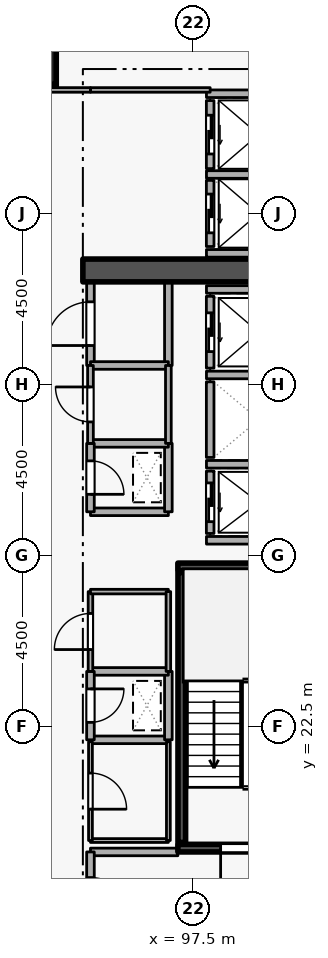
"""IFC4 building model, lengths in metres.
Left out: names, types, materials, properties, quantities, classifications, styles, units other than length and angle.
Written with IfcOpenShell. Run it as: python <this file> out.ifc"""

import sys

from ifc_helpers import new_model, si_unit, direction, frame, frame_2d, origin, origin_2d, place, context, subcontext, project, spatial, rectangle, extrude, element, fill, save


model = new_model("IFC4")
c1 = context("Model", 3, precision=1e-05, world=origin(), true_north=direction((0.0, 1.0)))
c2 = subcontext(c1, "Body", "Model", "MODEL_VIEW")
j1 = project(units=[si_unit("LENGTHUNIT", "METRE"), si_unit("PLANEANGLEUNIT", "RADIAN")], contexts=[c1])
p1 = place(None, origin())
s1 = spatial("IfcSite", under=j1, at=p1, CompositionType="ELEMENT")
p2 = place(p1, origin())
s2 = spatial("IfcBuilding", under=s1, at=p2, CompositionType="ELEMENT")
p3 = place(p2, frame((0.0, 0.0, 101.7)))
s3 = spatial("IfcBuildingStorey", under=s2, at=p3, CompositionType="ELEMENT", Elevation=101.7)
p4 = place(p3, frame((94.6, 34.5, 0.0), z_axis=(0.0, 0.0, 1.0), x_axis=(1.0, 0.0, 0.0)))
e1 = element("IfcWall", 1, at=p4, inside=s3, PredefinedType="SHEAR", context=c2, shape_type="SweptSolid", body=[
    extrude(rectangle(XDim=5.7, YDim=0.6, at=frame_2d((2.85, 0.0))), origin(), (0.0, 0.0, 1.0), 3.6),
])
p5 = place(p3, frame((93.3, 40.0, 0.0), z_axis=(0.0, 0.0, 1.0), x_axis=(1.0, 0.0, 0.0)))
e2 = element("IfcColumn", 2, at=p5, inside=s3, PredefinedType="COLUMN", context=c2, shape_type="SweptSolid", body=[
    extrude(rectangle(XDim=1.2, YDim=1.2, at=origin_2d()), origin(), (0.0, 0.0, 1.0), 3.6),
])
p6 = place(p3, frame((97.95, 29.22, 0.0), z_axis=(0.0, 0.0, 1.0), x_axis=(0.0, -1.0, 0.0)))
e3 = element("IfcWall", 3, at=p6, inside=s3, PredefinedType="STANDARD", context=c2, shape_type="SweptSolid", body=[
    extrude(rectangle(XDim=1.64, YDim=0.2, at=frame_2d((0.82, 0.0))), origin(), (0.0, 0.0, 1.0), 3.34),
])
p7 = place(p6, frame((0.31, 0.0, 0.0)))
e4 = element("IfcOpeningElement", 4, at=p7, cuts=e3, PredefinedType="OPENING", context=c2, shape_type="SweptSolid", body=[
    extrude(rectangle(XDim=1.02, YDim=2.06, at=frame_2d((0.51, 1.03))), frame((0.0, 0.11, 0.0), z_axis=(0.0, -1.0, 0.0), x_axis=(1.0, 0.0, 0.0)), (0.0, 0.0, 1.0), 0.22),
])
p8 = place(p3, frame((97.95, 31.57, 0.0), z_axis=(0.0, 0.0, 1.0), x_axis=(0.0, -1.0, 0.0)))
e5 = element("IfcWall", 5, at=p8, inside=s3, PredefinedType="STANDARD", context=c2, shape_type="SweptSolid", body=[
    extrude(rectangle(XDim=1.99, YDim=0.2, at=frame_2d((0.995, 0.0))), origin(), (0.0, 0.0, 1.0), 3.34),
])
p9 = place(p3, frame((97.95, 33.82, 0.0), z_axis=(0.0, 0.0, 1.0), x_axis=(0.0, -1.0, 0.0)))
e6 = element("IfcWall", 6, at=p9, inside=s3, PredefinedType="STANDARD", context=c2, shape_type="SweptSolid", body=[
    extrude(rectangle(XDim=1.89, YDim=0.2, at=frame_2d((0.945, 0.0))), origin(), (0.0, 0.0, 1.0), 3.34),
])
p10 = place(p9, frame((0.435, 0.0, 0.0)))
e7 = element("IfcOpeningElement", 7, at=p10, cuts=e6, PredefinedType="OPENING", context=c2, shape_type="SweptSolid", body=[
    extrude(rectangle(XDim=1.02, YDim=2.06, at=frame_2d((0.51, 1.03))), frame((0.0, 0.11, 0.0), z_axis=(0.0, -1.0, 0.0), x_axis=(1.0, 0.0, 0.0)), (0.0, 0.0, 1.0), 0.22),
])
p11 = place(p3, frame((97.95, 36.87, 0.0), z_axis=(0.0, 0.0, 1.0), x_axis=(0.0, -1.0, 0.0)))
e8 = element("IfcWall", 8, at=p11, inside=s3, PredefinedType="STANDARD", context=c2, shape_type="SweptSolid", body=[
    extrude(rectangle(XDim=1.74, YDim=0.2, at=frame_2d((0.87, 0.0))), origin(), (0.0, 0.0, 1.0), 3.34),
])
p12 = place(p11, frame((0.36, 0.0, 0.0)))
e9 = element("IfcOpeningElement", 9, at=p12, cuts=e8, PredefinedType="OPENING", context=c2, shape_type="SweptSolid", body=[
    extrude(rectangle(XDim=1.02, YDim=2.06, at=frame_2d((0.51, 1.03))), frame((0.0, 0.11, 0.0), z_axis=(0.0, -1.0, 0.0), x_axis=(1.0, 0.0, 0.0)), (0.0, 0.0, 1.0), 0.22),
])
p13 = place(p3, frame((97.95, 38.97, 0.0), z_axis=(0.0, 0.0, 1.0), x_axis=(0.0, -1.0, 0.0)))
e10 = element("IfcWall", 10, at=p13, inside=s3, PredefinedType="STANDARD", context=c2, shape_type="SweptSolid", body=[
    extrude(rectangle(XDim=1.79, YDim=0.2, at=frame_2d((0.895, 0.0))), origin(), (0.0, 0.0, 1.0), 3.34),
])
p14 = place(p13, frame((0.385, 0.0, 0.0)))
e11 = element("IfcOpeningElement", 11, at=p14, cuts=e10, PredefinedType="OPENING", context=c2, shape_type="SweptSolid", body=[
    extrude(rectangle(XDim=1.02, YDim=2.06, at=frame_2d((0.51, 1.03))), frame((0.0, 0.11, 0.0), z_axis=(0.0, -1.0, 0.0), x_axis=(1.0, 0.0, 0.0)), (0.0, 0.0, 1.0), 0.22),
])
for number, where, z_axis, x_axis in (
    (12, (97.852, 29.4, 0.0), (0.0, 0.0, 1.0), (1.0, 0.0, 0.0)),
    (13, (97.852, 27.4, 0.0), (0.0, 0.0, 1.0), (1.0, 0.0, 0.0)),
    (14, (97.852, 31.75, 0.0), (0.0, 0.0, 1.0), (1.0, 0.0, 0.0)),
    (15, (97.852, 34.0, 0.0), (0.0, 0.0, 1.0), (1.0, 0.0, 0.0)),
):
    element("IfcWall", number, at=place(p3, frame(where, z_axis=z_axis, x_axis=x_axis)), inside=s3, PredefinedType="STANDARD", context=c2, shape_type="SweptSolid", body=[
        extrude(rectangle(XDim=2.436, YDim=0.2, at=frame_2d((1.218, 0.0))), origin(), (0.0, 0.0, 1.0), 3.34),
    ])
for number, where, z_axis, x_axis in (
    (16, (97.852, 37.025, 0.0), (0.0, 0.0, 1.0), (1.0, 0.0, 0.0)),
    (17, (97.852, 34.95, 0.0), (0.0, 0.0, 1.0), (1.0, 0.0, 0.0)),
):
    element("IfcWall", number, at=place(p3, frame(where, z_axis=z_axis, x_axis=x_axis)), inside=s3, PredefinedType="STANDARD", context=c2, shape_type="SweptSolid", body=[
        extrude(rectangle(XDim=2.746, YDim=0.2, at=frame_2d((1.373, 0.0))), origin(), (0.0, 0.0, 1.0), 3.34),
    ])
p15 = place(p3, frame((97.852, 39.15, 0.0), z_axis=(0.0, 0.0, 1.0), x_axis=(1.0, 0.0, 0.0)))
e18 = element("IfcWall", 18, at=p15, inside=s3, PredefinedType="STANDARD", context=c2, shape_type="SweptSolid", body=[
    extrude(rectangle(XDim=2.636, YDim=0.2, at=frame_2d((1.318, 0.0))), origin(), (0.0, 0.0, 1.0), 3.34),
])
p16 = place(p3, frame((100.45, 19.3, 0.0), z_axis=(0.0, 0.0, 1.0), x_axis=(-1.0, 0.0, 0.0)))
e19 = element("IfcWall", 19, at=p16, inside=s3, PredefinedType="SHEAR", context=c2, shape_type="SweptSolid", body=[
    extrude(rectangle(XDim=3.35, YDim=0.2, at=frame_2d((1.675, 0.0))), origin(), (0.0, 0.0, 1.0), 3.6),
])
p17 = place(p16, frame((1.125, 0.0, 0.0)))
e20 = element("IfcOpeningElement", 20, at=p17, cuts=e19, PredefinedType="OPENING", context=c2, shape_type="SweptSolid", body=[
    extrude(rectangle(XDim=1.1, YDim=2.1, at=frame_2d((0.55, 1.05))), frame((0.0, 0.11, 0.0), z_axis=(0.0, -1.0, 0.0), x_axis=(1.0, 0.0, 0.0)), (0.0, 0.0, 1.0), 0.22),
])
p18 = place(p3, frame((97.1, 26.7, 0.0), z_axis=(0.0, 0.0, 1.0), x_axis=(1.0, 0.0, 0.0)))
e21 = element("IfcWall", 21, at=p18, inside=s3, PredefinedType="SHEAR", context=c2, shape_type="SweptSolid", body=[
    extrude(rectangle(XDim=3.35, YDim=0.2, at=frame_2d((1.675, 0.0))), origin(), (0.0, 0.0, 1.0), 3.6),
])
p19 = place(p3, frame((97.203, 26.55, 0.0), z_axis=(0.0, 0.0, 1.0), x_axis=(0.0, -1.0, 0.0)))
e22 = element("IfcWall", 22, at=p19, inside=s3, PredefinedType="SHEAR", context=c2, shape_type="SweptSolid", body=[
    extrude(rectangle(XDim=7.1, YDim=0.2, at=frame_2d((3.55, 0.0))), origin(), (0.0, 0.0, 1.0), 3.6),
])
p20 = place(p3, frame((97.1, 19.2, 0.0), z_axis=(0.0, 0.0, 1.0), x_axis=(-1.0, 0.0, 0.0)))
e23 = element("IfcWall", 23, at=p20, inside=s3, PredefinedType="STANDARD", context=c2, shape_type="SweptSolid", body=[
    extrude(rectangle(XDim=2.3, YDim=0.2, at=frame_2d((1.15, 0.0))), origin(), (0.0, 0.0, 1.0), 2.545),
])
p21 = place(p3, frame((94.8, 19.2, 0.0), z_axis=(0.0, 0.0, 1.0), x_axis=(0.0, -1.0, 0.0)))
e24 = element("IfcWall", 24, at=p21, inside=s3, PredefinedType="STANDARD", context=c2, shape_type="SweptSolid", body=[
    extrude(rectangle(XDim=2.5, YDim=0.2, at=frame_2d((1.25, 0.0))), origin(), (0.0, 0.0, 1.0), 3.34),
])
p22 = place(p21, frame((0.675, 0.0, 0.0)))
e25 = element("IfcOpeningElement", 25, at=p22, cuts=e24, PredefinedType="OPENING", context=c2, shape_type="SweptSolid", body=[
    extrude(rectangle(XDim=1.15, YDim=2.1, at=frame_2d((0.575, 1.05))), frame((0.0, 0.11, 0.0), z_axis=(0.0, -1.0, 0.0), x_axis=(1.0, 0.0, 0.0)), (0.0, 0.0, 1.0), 0.22),
])
p23 = place(p3, frame((94.8, 28.15, 0.0), z_axis=(0.0, 0.0, 1.0), x_axis=(1.0, 0.0, 0.0)))
e26 = element("IfcWall", 26, at=p23, inside=s3, PredefinedType="STANDARD", context=c2, shape_type="SweptSolid", body=[
    extrude(rectangle(XDim=2.05, YDim=0.2, at=frame_2d((1.025, 0.0))), origin(), (0.0, 0.0, 1.0), 3.34),
])
p24 = place(p3, frame((96.85, 28.15, 0.0), z_axis=(0.0, 0.0, 1.0), x_axis=(0.0, 1.0, 0.0)))
e27 = element("IfcWall", 27, at=p24, inside=s3, PredefinedType="STANDARD", context=c2, shape_type="SweptSolid", body=[
    extrude(rectangle(XDim=1.8, YDim=0.2, at=frame_2d((0.9, 0.0))), origin(), (0.0, 0.0, 1.0), 3.34),
])
p25 = place(p3, frame((96.85, 29.95, 0.0), z_axis=(0.0, 0.0, 1.0), x_axis=(-1.0, 0.0, 0.0)))
e28 = element("IfcWall", 28, at=p25, inside=s3, PredefinedType="STANDARD", context=c2, shape_type="SweptSolid", body=[
    extrude(rectangle(XDim=2.05, YDim=0.2, at=frame_2d((1.025, 0.0))), origin(), (0.0, 0.0, 1.0), 3.34),
])
p26 = place(p3, frame((94.8, 29.95, 0.0), z_axis=(0.0, 0.0, 1.0), x_axis=(0.0, -1.0, 0.0)))
e29 = element("IfcWall", 29, at=p26, inside=s3, PredefinedType="STANDARD", context=c2, shape_type="SweptSolid", body=[
    extrude(rectangle(XDim=1.8, YDim=0.2, at=frame_2d((0.9, 0.0))), origin(), (0.0, 0.0, 1.0), 3.34),
])
p27 = place(p26, frame((0.46, 0.0, 0.0)))
e30 = element("IfcOpeningElement", 30, at=p27, cuts=e29, PredefinedType="OPENING", context=c2, shape_type="SweptSolid", body=[
    extrude(rectangle(XDim=0.88, YDim=2.04, at=frame_2d((0.44, 1.02))), frame((0.0, 0.11, 0.0), z_axis=(0.0, -1.0, 0.0), x_axis=(1.0, 0.0, 0.0)), (0.0, 0.0, 1.0), 0.22),
])
p28 = place(p3, frame((94.8, 22.15, 0.0), z_axis=(0.0, 0.0, 1.0), x_axis=(1.0, 0.0, 0.0)))
e31 = element("IfcWall", 31, at=p28, inside=s3, PredefinedType="STANDARD", context=c2, shape_type="SweptSolid", body=[
    extrude(rectangle(XDim=2.05, YDim=0.2, at=frame_2d((1.025, 0.0))), origin(), (0.0, 0.0, 1.0), 3.34),
])
p29 = place(p3, frame((96.85, 22.15, 0.0), z_axis=(0.0, 0.0, 1.0), x_axis=(0.0, 1.0, 0.0)))
e32 = element("IfcWall", 32, at=p29, inside=s3, PredefinedType="STANDARD", context=c2, shape_type="SweptSolid", body=[
    extrude(rectangle(XDim=1.8, YDim=0.2, at=frame_2d((0.9, 0.0))), origin(), (0.0, 0.0, 1.0), 3.34),
])
p30 = place(p3, frame((96.85, 23.95, 0.0), z_axis=(0.0, 0.0, 1.0), x_axis=(-1.0, 0.0, 0.0)))
e33 = element("IfcWall", 33, at=p30, inside=s3, PredefinedType="STANDARD", context=c2, shape_type="SweptSolid", body=[
    extrude(rectangle(XDim=2.05, YDim=0.2, at=frame_2d((1.025, 0.0))), origin(), (0.0, 0.0, 1.0), 3.34),
])
p31 = place(p3, frame((94.8, 23.95, 0.0), z_axis=(0.0, 0.0, 1.0), x_axis=(0.0, -1.0, 0.0)))
e34 = element("IfcWall", 34, at=p31, inside=s3, PredefinedType="STANDARD", context=c2, shape_type="SweptSolid", body=[
    extrude(rectangle(XDim=1.8, YDim=0.2, at=frame_2d((0.9, 0.0))), origin(), (0.0, 0.0, 1.0), 3.34),
])
p32 = place(p31, frame((0.46, 0.0, 0.0)))
e35 = element("IfcOpeningElement", 35, at=p32, cuts=e34, PredefinedType="OPENING", context=c2, shape_type="SweptSolid", body=[
    extrude(rectangle(XDim=0.88, YDim=2.04, at=frame_2d((0.44, 1.02))), frame((0.0, 0.11, 0.0), z_axis=(0.0, -1.0, 0.0), x_axis=(1.0, 0.0, 0.0)), (0.0, 0.0, 1.0), 0.22),
])
p33 = place(p3, frame((94.8, 32.0, 0.0), z_axis=(0.0, 0.0, 1.0), x_axis=(0.0, 1.0, 0.0)))
e36 = element("IfcWall", 36, at=p33, inside=s3, PredefinedType="STANDARD", context=c2, shape_type="SweptSolid", body=[
    extrude(rectangle(XDim=2.2, YDim=0.2, at=frame_2d((1.1, 0.0))), origin(), (0.0, 0.0, 1.0), 3.34),
])
p34 = place(p33, frame((0.525, 0.0, 0.0)))
e37 = element("IfcOpeningElement", 37, at=p34, cuts=e36, PredefinedType="OPENING", context=c2, shape_type="SweptSolid", body=[
    extrude(rectangle(XDim=1.15, YDim=2.1, at=frame_2d((0.575, 1.05))), frame((0.0, 0.11, 0.0), z_axis=(0.0, -1.0, 0.0), x_axis=(1.0, 0.0, 0.0)), (0.0, 0.0, 1.0), 0.22),
])
p35 = place(p3, frame((96.85, 34.2, 0.0), z_axis=(0.0, 0.0, 1.0), x_axis=(0.0, -1.0, 0.0)))
e38 = element("IfcWall", 38, at=p35, inside=s3, PredefinedType="STANDARD", context=c2, shape_type="SweptSolid", body=[
    extrude(rectangle(XDim=2.2, YDim=0.2, at=frame_2d((1.1, 0.0))), origin(), (0.0, 0.0, 1.0), 3.34),
])
p36 = place(p3, frame((96.85, 32.0, 0.0), z_axis=(0.0, 0.0, 1.0), x_axis=(-1.0, 0.0, 0.0)))
e39 = element("IfcWall", 39, at=p36, inside=s3, PredefinedType="STANDARD", context=c2, shape_type="SweptSolid", body=[
    extrude(rectangle(XDim=2.05, YDim=0.2, at=frame_2d((1.025, 0.0))), origin(), (0.0, 0.0, 1.0), 3.34),
])
p37 = place(p3, frame((94.8, 19.5, 0.0), z_axis=(0.0, 0.0, 1.0), x_axis=(1.0, 0.0, 0.0)))
e40 = element("IfcWall", 40, at=p37, inside=s3, PredefinedType="PARTITIONING", context=c2, shape_type="SweptSolid", body=[
    extrude(rectangle(XDim=2.05, YDim=0.1, at=frame_2d((1.025, 0.0))), origin(), (0.0, 0.0, 1.0), 2.545),
])
p38 = place(p3, frame((96.85, 19.5, 0.0), z_axis=(0.0, 0.0, 1.0), x_axis=(0.0, 1.0, 0.0)))
e41 = element("IfcWall", 41, at=p38, inside=s3, PredefinedType="PARTITIONING", context=c2, shape_type="SweptSolid", body=[
    extrude(rectangle(XDim=2.6, YDim=0.1, at=frame_2d((1.3, 0.0))), origin(), (0.0, 0.0, 1.0), 3.34),
])
p39 = place(p3, frame((94.8, 22.1, 0.0), z_axis=(0.0, 0.0, 1.0), x_axis=(0.0, -1.0, 0.0)))
e42 = element("IfcWall", 42, at=p39, inside=s3, PredefinedType="PARTITIONING", context=c2, shape_type="SweptSolid", body=[
    extrude(rectangle(XDim=2.6, YDim=0.1, at=frame_2d((1.3, 0.0))), origin(), (0.0, 0.0, 1.0), 3.34),
])
p40 = place(p39, frame((0.825, 0.0, 0.0)))
e43 = element("IfcOpeningElement", 43, at=p40, cuts=e42, PredefinedType="OPENING", context=c2, shape_type="SweptSolid", body=[
    extrude(rectangle(XDim=0.95, YDim=2.1, at=frame_2d((0.475, 1.05))), frame((0.0, 0.06, 0.0), z_axis=(0.0, -1.0, 0.0), x_axis=(1.0, 0.0, 0.0)), (0.0, 0.0, 1.0), 0.12),
])
p41 = place(p3, frame((94.8, 23.95, 0.0), z_axis=(0.0, 0.0, 1.0), x_axis=(0.0, 1.0, 0.0)))
e44 = element("IfcWall", 44, at=p41, inside=s3, PredefinedType="PARTITIONING", context=c2, shape_type="SweptSolid", body=[
    extrude(rectangle(XDim=2.1, YDim=0.12, at=frame_2d((1.05, 0.0))), origin(), (0.0, 0.0, 1.0), 3.34),
])
p42 = place(p41, frame((0.575, 0.0, 0.0)))
e45 = element("IfcOpeningElement", 45, at=p42, cuts=e44, PredefinedType="OPENING", context=c2, shape_type="SweptSolid", body=[
    extrude(rectangle(XDim=0.95, YDim=2.1, at=frame_2d((0.475, 1.05))), frame((0.0, 0.07, 0.0), z_axis=(0.0, -1.0, 0.0), x_axis=(1.0, 0.0, 0.0)), (0.0, 0.0, 1.0), 0.14),
])
p43 = place(p3, frame((94.8, 26.05, 0.0), z_axis=(0.0, 0.0, 1.0), x_axis=(1.0, 0.0, 0.0)))
e46 = element("IfcWall", 46, at=p43, inside=s3, PredefinedType="PARTITIONING", context=c2, shape_type="SweptSolid", body=[
    extrude(rectangle(XDim=2.05, YDim=0.12, at=frame_2d((1.025, 0.0))), origin(), (0.0, 0.0, 1.0), 3.34),
])
p44 = place(p3, frame((96.85, 26.05, 0.0), z_axis=(0.0, 0.0, 1.0), x_axis=(0.0, -1.0, 0.0)))
e47 = element("IfcWall", 47, at=p44, inside=s3, PredefinedType="PARTITIONING", context=c2, shape_type="SweptSolid", body=[
    extrude(rectangle(XDim=2.1, YDim=0.12, at=frame_2d((1.05, 0.0))), origin(), (0.0, 0.0, 1.0), 3.34),
])
p45 = place(p3, frame((94.8, 29.95, 0.0), z_axis=(0.0, 0.0, 1.0), x_axis=(0.0, 1.0, 0.0)))
e48 = element("IfcWall", 48, at=p45, inside=s3, PredefinedType="PARTITIONING", context=c2, shape_type="SweptSolid", body=[
    extrude(rectangle(XDim=2.05, YDim=0.15, at=frame_2d((1.025, 0.0))), origin(), (0.0, 0.0, 1.0), 3.34),
])
p46 = place(p45, frame((0.565, 0.0, 0.0)))
e49 = element("IfcOpeningElement", 49, at=p46, cuts=e48, PredefinedType="OPENING", context=c2, shape_type="SweptSolid", body=[
    extrude(rectangle(XDim=0.92, YDim=2.08, at=frame_2d((0.46, 1.04))), frame((0.0, 0.085, 0.0), z_axis=(0.0, -1.0, 0.0), x_axis=(1.0, 0.0, 0.0)), (0.0, 0.0, 1.0), 0.17),
])
p47 = place(p3, frame((96.85, 32.0, 0.0), z_axis=(0.0, 0.0, 1.0), x_axis=(0.0, -1.0, 0.0)))
e50 = element("IfcWall", 50, at=p47, inside=s3, PredefinedType="PARTITIONING", context=c2, shape_type="SweptSolid", body=[
    extrude(rectangle(XDim=2.05, YDim=0.15, at=frame_2d((1.025, 0.0))), origin(), (0.0, 0.0, 1.0), 3.34),
])
p48 = place(p3, frame((97.95, 39.25, 0.0), z_axis=(0.0, 0.0, 1.0), x_axis=(-1.0, 0.0, 0.0)))
e51 = element("IfcWall", 51, at=p48, inside=s3, PredefinedType="PARTITIONING", context=c2, shape_type="SweptSolid", body=[
    extrude(rectangle(XDim=3.15, YDim=0.12, at=frame_2d((1.575, 0.0))), origin(), (0.0, 0.0, 1.0), 3.34),
])
p49 = place(p3, frame((94.8, 39.25, 0.0), z_axis=(0.0, 0.0, 1.0), x_axis=(-1.0, 0.0, 0.0)))
e52 = element("IfcWall", 52, at=p49, inside=s3, PredefinedType="PARTITIONING", context=c2, shape_type="SweptSolid", body=[
    extrude(rectangle(XDim=1.85, YDim=0.12, at=frame_2d((0.925, 0.0))), origin(), (0.0, 0.0, 1.0), 3.34),
])
p50 = place(p7, origin())
e53 = element("IfcDoor", 53, at=p50, inside=s3, OperationType="SLIDING_TO_LEFT", PredefinedType="DOOR", context=c2, shape_type="SweptSolid", body=[
    extrude(rectangle(XDim=1.02, YDim=2.06, at=frame_2d((0.51, 1.03))), frame((0.0, 0.025, 0.0), z_axis=(0.0, -1.0, 0.0), x_axis=(1.0, 0.0, 0.0)), (0.0, 0.0, 1.0), 0.05),
])
fill(e4, e53)
p51 = place(p10, origin())
e54 = element("IfcDoor", 54, at=p51, inside=s3, OperationType="SLIDING_TO_LEFT", PredefinedType="DOOR", context=c2, shape_type="SweptSolid", body=[
    extrude(rectangle(XDim=1.02, YDim=2.06, at=frame_2d((0.51, 1.03))), frame((0.0, 0.025, 0.0), z_axis=(0.0, -1.0, 0.0), x_axis=(1.0, 0.0, 0.0)), (0.0, 0.0, 1.0), 0.05),
])
fill(e7, e54)
p52 = place(p12, origin())
e55 = element("IfcDoor", 55, at=p52, inside=s3, OperationType="SLIDING_TO_LEFT", PredefinedType="DOOR", context=c2, shape_type="SweptSolid", body=[
    extrude(rectangle(XDim=1.02, YDim=2.06, at=frame_2d((0.51, 1.03))), frame((0.0, 0.025, 0.0), z_axis=(0.0, -1.0, 0.0), x_axis=(1.0, 0.0, 0.0)), (0.0, 0.0, 1.0), 0.05),
])
fill(e9, e55)
p53 = place(p14, origin())
e56 = element("IfcDoor", 56, at=p53, inside=s3, OperationType="SLIDING_TO_LEFT", PredefinedType="DOOR", context=c2, shape_type="SweptSolid", body=[
    extrude(rectangle(XDim=1.02, YDim=2.06, at=frame_2d((0.51, 1.03))), frame((0.0, 0.025, 0.0), z_axis=(0.0, -1.0, 0.0), x_axis=(1.0, 0.0, 0.0)), (0.0, 0.0, 1.0), 0.05),
])
fill(e11, e56)
p54 = place(p17, origin())
e57 = element("IfcDoor", 57, at=p54, inside=s3, OperationType="SINGLE_SWING_RIGHT", PredefinedType="DOOR", context=c2, shape_type="SweptSolid", body=[
    extrude(rectangle(XDim=1.1, YDim=2.1, at=frame_2d((0.55, 1.05))), frame((0.0, 0.025, 0.0), z_axis=(0.0, -1.0, 0.0), x_axis=(1.0, 0.0, 0.0)), (0.0, 0.0, 1.0), 0.05),
])
fill(e20, e57)
p55 = place(p22, origin())
e58 = element("IfcDoor", 58, at=p55, inside=s3, OperationType="SINGLE_SWING_RIGHT", PredefinedType="DOOR", context=c2, shape_type="SweptSolid", body=[
    extrude(rectangle(XDim=1.15, YDim=2.1, at=frame_2d((0.575, 1.05))), frame((0.0, 0.025, 0.0), z_axis=(0.0, -1.0, 0.0), x_axis=(1.0, 0.0, 0.0)), (0.0, 0.0, 1.0), 0.05),
])
fill(e25, e58)
p56 = place(p27, origin())
e59 = element("IfcDoor", 59, at=p56, inside=s3, OperationType="SINGLE_SWING_RIGHT", PredefinedType="DOOR", context=c2, shape_type="SweptSolid", body=[
    extrude(rectangle(XDim=0.88, YDim=2.04, at=frame_2d((0.44, 1.02))), frame((0.0, 0.025, 0.0), z_axis=(0.0, -1.0, 0.0), x_axis=(1.0, 0.0, 0.0)), (0.0, 0.0, 1.0), 0.05),
])
fill(e30, e59)
p57 = place(p32, origin())
e60 = element("IfcDoor", 60, at=p57, inside=s3, OperationType="SINGLE_SWING_LEFT", PredefinedType="DOOR", context=c2, shape_type="SweptSolid", body=[
    extrude(rectangle(XDim=0.88, YDim=2.04, at=frame_2d((0.44, 1.02))), frame((0.0, 0.025, 0.0), z_axis=(0.0, -1.0, 0.0), x_axis=(1.0, 0.0, 0.0)), (0.0, 0.0, 1.0), 0.05),
])
fill(e35, e60)
p58 = place(p40, origin())
e61 = element("IfcDoor", 61, at=p58, inside=s3, OperationType="SINGLE_SWING_RIGHT", PredefinedType="DOOR", context=c2, shape_type="SweptSolid", body=[
    extrude(rectangle(XDim=0.95, YDim=2.1, at=frame_2d((0.475, 1.05))), frame((0.0, 0.025, 0.0), z_axis=(0.0, -1.0, 0.0), x_axis=(1.0, 0.0, 0.0)), (0.0, 0.0, 1.0), 0.05),
])
fill(e43, e61)
p59 = place(p42, origin())
e62 = element("IfcDoor", 62, at=p59, inside=s3, OperationType="SINGLE_SWING_LEFT", PredefinedType="DOOR", context=c2, shape_type="SweptSolid", body=[
    extrude(rectangle(XDim=0.95, YDim=2.1, at=frame_2d((0.475, 1.05))), frame((0.0, 0.025, 0.0), z_axis=(0.0, -1.0, 0.0), x_axis=(1.0, 0.0, 0.0)), (0.0, 0.0, 1.0), 0.05),
])
fill(e45, e62)
p60 = place(p46, origin())
e63 = element("IfcDoor", 63, at=p60, inside=s3, OperationType="SINGLE_SWING_RIGHT", PredefinedType="DOOR", context=c2, shape_type="SweptSolid", body=[
    extrude(rectangle(XDim=0.92, YDim=2.08, at=frame_2d((0.46, 1.04))), frame((0.0, 0.025, 0.0), z_axis=(0.0, -1.0, 0.0), x_axis=(1.0, 0.0, 0.0)), (0.0, 0.0, 1.0), 0.05),
])
fill(e49, e63)
p61 = place(p34, origin())
e64 = element("IfcDoor", 64, at=p61, inside=s3, OperationType="SINGLE_SWING_LEFT", PredefinedType="DOOR", context=c2, shape_type="SweptSolid", body=[
    extrude(rectangle(XDim=1.15, YDim=2.1, at=frame_2d((0.575, 1.05))), frame((0.0, 0.025, 0.0), z_axis=(0.0, -1.0, 0.0), x_axis=(1.0, 0.0, 0.0)), (0.0, 0.0, 1.0), 0.05),
])
fill(e37, e64)
save(model, sys.argv[1])
